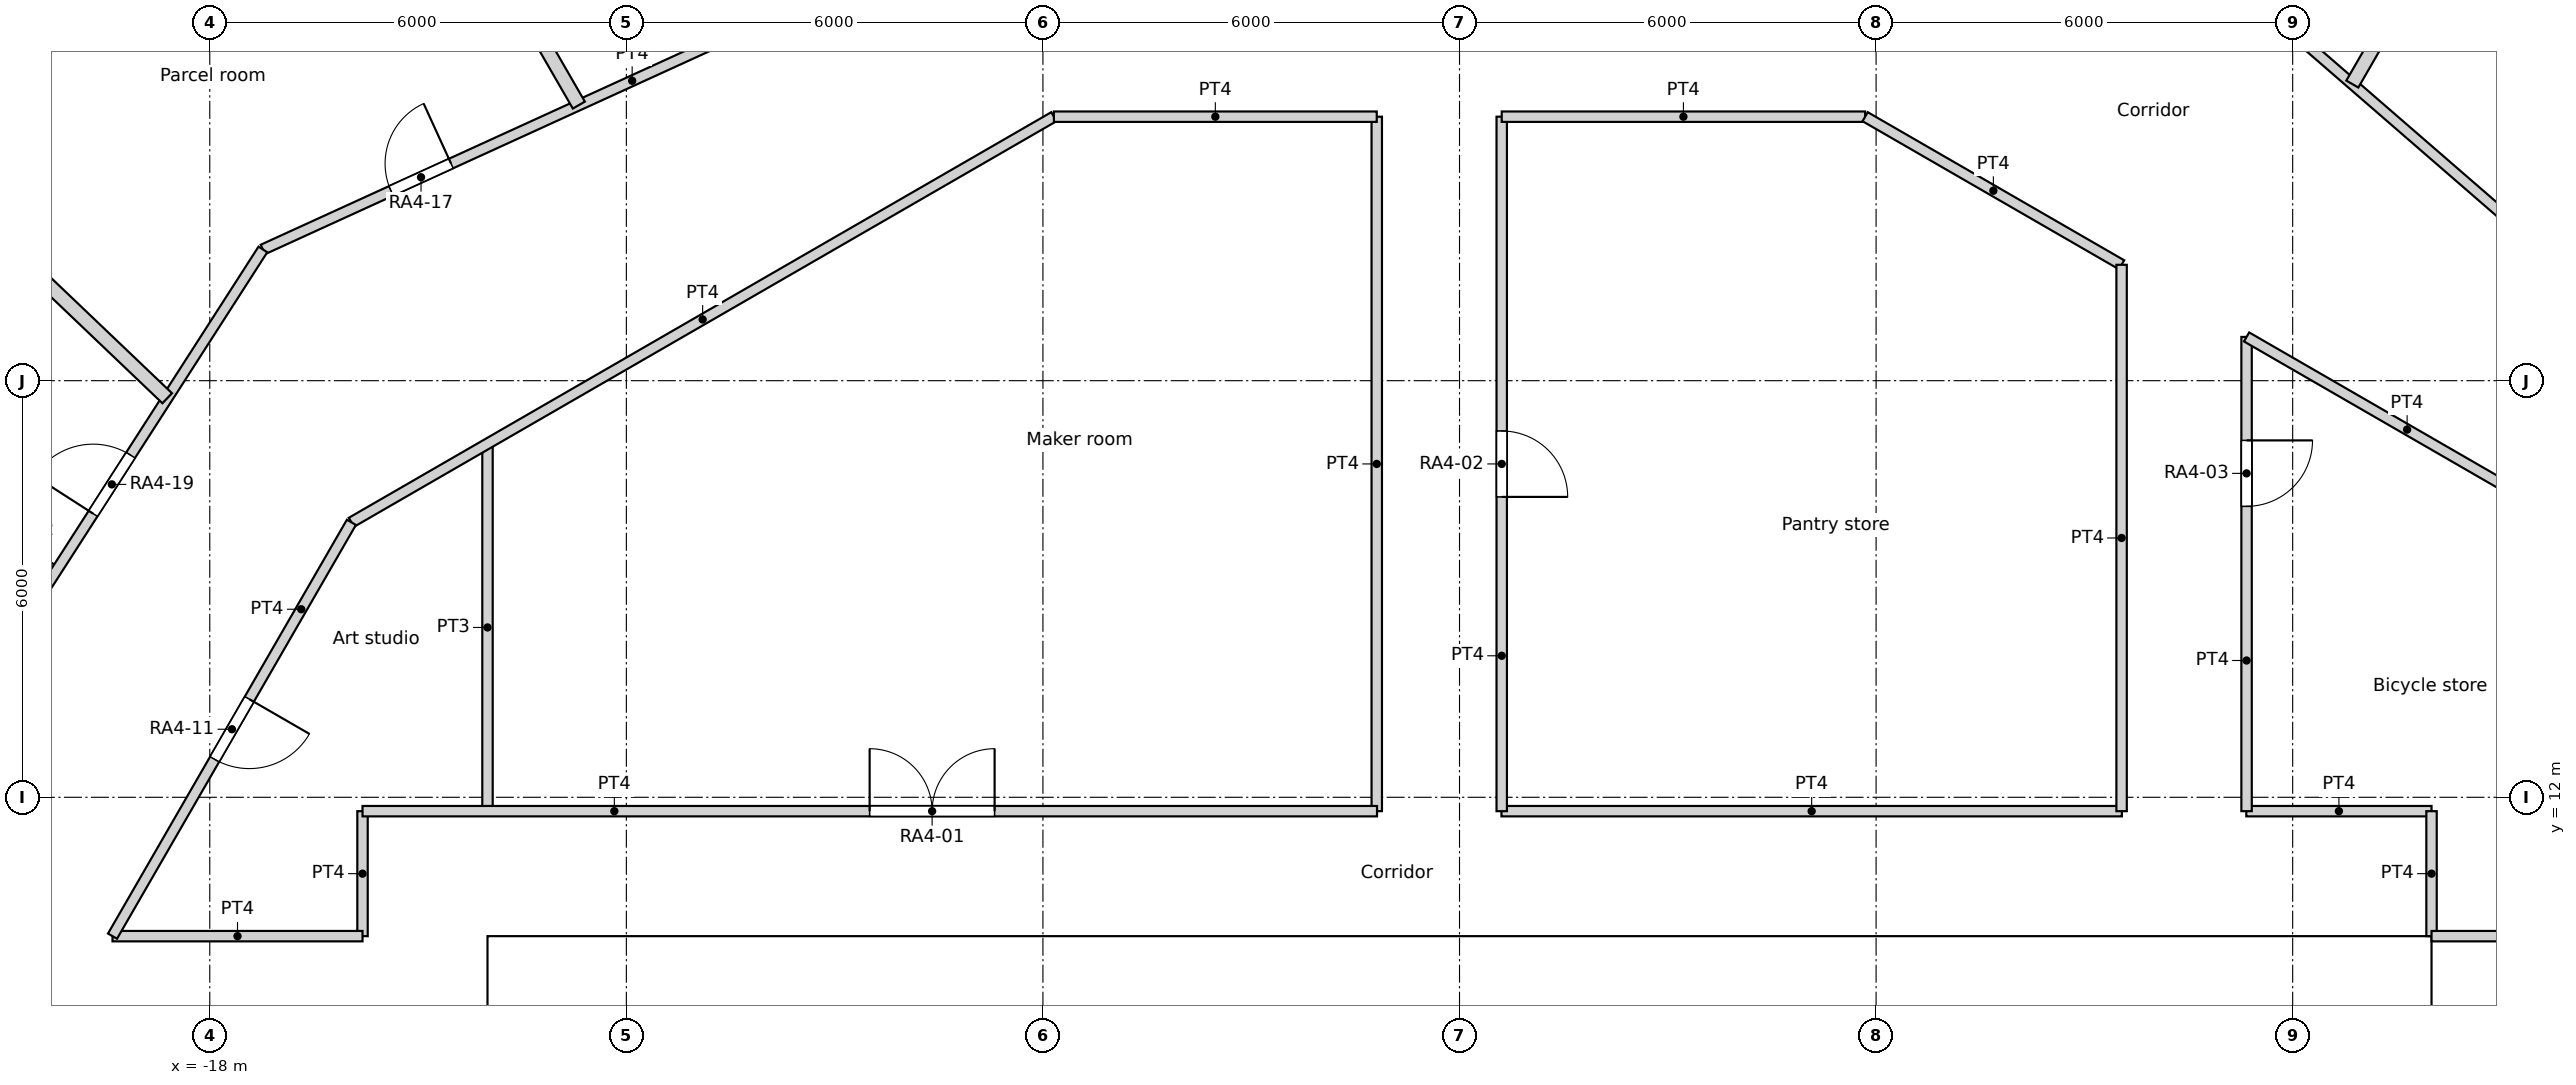
"""IFC4 building model, lengths in metres.
Left out: names, types, materials, properties, quantities, classifications, styles, units other than length and angle.
Written with IfcOpenShell. Run it as: python <this file> out.ifc"""

import sys

from ifc_helpers import new_model, si_unit, direction, frame, frame_2d, origin, origin_2d, place, context, subcontext, project, spatial, rectangle, circle, extrude, element, fill, save


model = new_model("IFC4")
c1 = context("Model", 3, precision=1e-05, world=origin(), true_north=direction((0.0, 1.0)))
c2 = subcontext(c1, "Body", "Model", "MODEL_VIEW")
j1 = project(units=[si_unit("LENGTHUNIT", "METRE"), si_unit("PLANEANGLEUNIT", "RADIAN")], contexts=[c1])
p1 = place(None, origin())
s1 = spatial("IfcSite", under=j1, at=p1, CompositionType="ELEMENT")
p2 = place(p1, origin())
s2 = spatial("IfcBuilding", under=s1, at=p2, CompositionType="ELEMENT")
p3 = place(p2, frame((0.0, 0.0, 60.6)))
s3 = spatial("IfcBuildingStorey", under=s2, at=p3, CompositionType="ELEMENT", Elevation=60.6)
p4 = place(p3, frame((-19.826, 22.88, 0.0), z_axis=(0.0, 0.0, 1.0), x_axis=(1.0, 0.0, 0.0)))
e1 = element("IfcColumn", 1, at=p4, inside=s3, PredefinedType="COLUMN", context=c2, shape_type="SweptSolid", body=[
    extrude(circle(Radius=0.7, at=origin_2d()), origin(), (0.0, 0.0, 1.0), 3.6),
])
for number, where, z_axis, x_axis in (
    (2, (14.659, 19.69, 0.0), (0.0, 0.0, 1.0), (1.0, 0.0, 0.0)),
    (3, (9.723, 22.54, 0.0), (0.0, 0.0, 1.0), (1.0, 0.0, 0.0)),
    (4, (-12.274, 21.259, 0.0), (0.0, 0.0, 1.0), (1.0, 0.0, 0.0)),
    (5, (-16.846, 17.855, 0.0), (0.0, 0.0, 1.0), (1.0, 0.0, 0.0)),
    (6, (-20.509, 13.489, 0.0), (0.0, 0.0, 1.0), (1.0, 0.0, 0.0)),
):
    element("IfcColumn", number, at=place(p3, frame(where, z_axis=z_axis, x_axis=x_axis)), inside=s3, PredefinedType="COLUMN", context=c2, shape_type="SweptSolid", body=[
        extrude(circle(Radius=0.75, at=origin_2d()), origin(), (0.0, 0.0, 1.0), 3.6),
    ])
for number, where, z_axis, x_axis in (
    (7, (15.552, 10.603, 0.0), (0.0, 0.0, 1.0), (1.0, 0.0, 0.0)),
    (8, (11.735, 14.716, 0.0), (0.0, 0.0, 1.0), (1.0, 0.0, 0.0)),
    (9, (6.876, 17.521, 0.0), (0.0, 0.0, 1.0), (1.0, 0.0, 0.0)),
    (10, (1.406, 18.77, 0.0), (0.0, 0.0, 1.0), (1.0, 0.0, 0.0)),
    (11, (-4.188, 18.35, 0.0), (0.0, 0.0, 1.0), (1.0, 0.0, 0.0)),
    (12, (-9.411, 16.301, 0.0), (0.0, 0.0, 1.0), (1.0, 0.0, 0.0)),
    (13, (-13.798, 12.802, 0.0), (0.0, 0.0, 1.0), (1.0, 0.0, 0.0)),
):
    element("IfcColumn", number, at=place(p3, frame(where, z_axis=z_axis, x_axis=x_axis)), inside=s3, PredefinedType="COLUMN", context=c2, shape_type="SweptSolid", body=[
        extrude(circle(Radius=0.8, at=origin_2d()), origin(), (0.0, 0.0, 1.0), 3.6),
    ])
p5 = place(p3, frame((-14.0, 9.4, 0.0), z_axis=(0.0, 0.0, 1.0), x_axis=(1.0, 0.0, 0.0)))
e14 = element("IfcWall", 14, at=p5, inside=s3, PredefinedType="SOLIDWALL", context=c2, shape_type="SweptSolid", body=[
    extrude(rectangle(XDim=28.0, YDim=1.2, at=frame_2d((14.0, 0.0))), origin(), (0.0, 0.0, 1.0), 3.6),
])
p6 = place(p5, frame((9.8, 0.0, 0.0)))
e15 = element("IfcOpeningElement", 15, at=p6, cuts=e14, PredefinedType="OPENING", context=c2, shape_type="SweptSolid", body=[
    extrude(rectangle(XDim=1.8, YDim=2.1, at=frame_2d((0.9, 1.05))), frame((0.0, 0.6, 0.0), z_axis=(0.0, -1.0, 0.0), x_axis=(1.0, 0.0, 0.0)), (0.0, 0.0, 1.0), 1.2),
])
p7 = place(p3, frame((-15.8, 11.8, 0.0), z_axis=(0.0, 0.0, 1.0), x_axis=(1.0, 0.0, 0.0)))
e16 = element("IfcWall", 16, at=p7, inside=s3, PredefinedType="PARTITIONING", context=c2, shape_type="SweptSolid", body=[
    extrude(rectangle(XDim=14.612, YDim=0.15, at=frame_2d((7.306, 0.0))), origin(), (0.0, 0.0, 1.0), 3.15),
])
p8 = place(p7, frame((7.304, 0.0, 0.0)))
e17 = element("IfcOpeningElement", 17, at=p8, cuts=e16, PredefinedType="OPENING", context=c2, shape_type="SweptSolid", body=[
    extrude(rectangle(XDim=1.8, YDim=2.1, at=frame_2d((0.9, 1.05))), frame((0.0, 0.075, 0.0), z_axis=(0.0, -1.0, 0.0), x_axis=(1.0, 0.0, 0.0)), (0.0, 0.0, 1.0), 0.15),
])
p9 = place(p3, frame((0.604, 11.8, 0.0), z_axis=(0.0, 0.0, 1.0), x_axis=(1.0, 0.0, 0.0)))
e18 = element("IfcWall", 18, at=p9, inside=s3, PredefinedType="PARTITIONING", context=c2, shape_type="SweptSolid", body=[
    extrude(rectangle(XDim=8.936, YDim=0.15, at=frame_2d((4.468, 0.0))), origin(), (0.0, 0.0, 1.0), 3.15),
])
p10 = place(p3, frame((11.332, 11.8, 0.0), z_axis=(0.0, 0.0, 1.0), x_axis=(1.0, 0.0, 0.0)))
e19 = element("IfcWall", 19, at=p10, inside=s3, PredefinedType="PARTITIONING", context=c2, shape_type="SweptSolid", body=[
    extrude(rectangle(XDim=2.668, YDim=0.15, at=frame_2d((1.334, 0.0))), origin(), (0.0, 0.0, 1.0), 3.15),
])
for number, where, z_axis, x_axis in (
    (20, (14.0, 10.0, 0.0), (0.0, 0.0, 1.0), (0.0, 1.0, 0.0)),
    (21, (-15.8, 10.0, 0.0), (0.0, 0.0, 1.0), (0.0, 1.0, 0.0)),
):
    element("IfcWall", number, at=place(p3, frame(where, z_axis=z_axis, x_axis=x_axis)), inside=s3, PredefinedType="PARTITIONING", context=c2, shape_type="SweptSolid", body=[
        extrude(rectangle(XDim=1.8, YDim=0.15, at=frame_2d((0.9, 0.0))), origin(), (0.0, 0.0, 1.0), 3.15),
    ])
p11 = place(p3, frame((14.0, 10.0, 0.0), z_axis=(0.0, 0.0, 1.0), x_axis=(1.0, 0.0, 0.0)))
e22 = element("IfcWall", 22, at=p11, inside=s3, PredefinedType="PARTITIONING", context=c2, shape_type="SweptSolid", body=[
    extrude(rectangle(XDim=5.401, YDim=0.15, at=frame_2d((2.7, 0.0))), origin(), (0.0, 0.0, 1.0), 3.15),
])
p12 = place(p3, frame((10.933, 23.94, 0.0), z_axis=(0.0, 0.0, 1.0), x_axis=(0.755770011705, -0.654837147242, 0.0)))
e23 = element("IfcWall", 23, at=p12, inside=s3, PredefinedType="PARTITIONING", context=c2, shape_type="SweptSolid", body=[
    extrude(rectangle(XDim=14.83, YDim=0.15, at=frame_2d((7.415, 0.0))), origin(), (0.0, 0.0, 1.0), 3.15),
])
p13 = place(p12, frame((6.807, 0.0, 0.0)))
e24 = element("IfcOpeningElement", 24, at=p13, cuts=e23, PredefinedType="OPENING", context=c2, shape_type="SweptSolid", body=[
    extrude(rectangle(XDim=0.95, YDim=2.1, at=frame_2d((0.475, 1.05))), frame((0.0, 0.075, 0.0), z_axis=(0.0, -1.0, 0.0), x_axis=(1.0, 0.0, 0.0)), (0.0, 0.0, 1.0), 0.15),
])
p14 = place(p3, frame((-1.192, 11.8, 0.0), z_axis=(0.0, 0.0, 1.0), x_axis=(0.0, 1.0, 0.0)))
e25 = element("IfcWall", 25, at=p14, inside=s3, PredefinedType="PARTITIONING", context=c2, shape_type="SweptSolid", body=[
    extrude(rectangle(XDim=10.002, YDim=0.15, at=frame_2d((5.001, 0.0))), origin(), (0.0, 0.0, 1.0), 3.15),
])
p15 = place(p3, frame((-5.842, 21.802, 0.0), z_axis=(0.0, 0.0, 1.0), x_axis=(1.0, 0.0, 0.0)))
e26 = element("IfcWall", 26, at=p15, inside=s3, PredefinedType="PARTITIONING", context=c2, shape_type="SweptSolid", body=[
    extrude(rectangle(XDim=4.65, YDim=0.15, at=frame_2d((2.325, 0.0))), origin(), (0.0, 0.0, 1.0), 3.15),
])
p16 = place(p3, frame((-15.96, 15.96, 0.0), z_axis=(0.0, 0.0, 1.0), x_axis=(0.866022730501, 0.500004630234, 0.0)))
e27 = element("IfcWall", 27, at=p16, inside=s3, PredefinedType="PARTITIONING", context=c2, shape_type="SweptSolid", body=[
    extrude(rectangle(XDim=11.684, YDim=0.15, at=frame_2d((5.842, 0.0))), origin(), (0.0, 0.0, 1.0), 3.15),
])
p17 = place(p3, frame((9.536, 11.8, 0.0), z_axis=(0.0, 0.0, 1.0), x_axis=(0.0, 1.0, 0.0)))
e28 = element("IfcWall", 28, at=p17, inside=s3, PredefinedType="PARTITIONING", context=c2, shape_type="SweptSolid", body=[
    extrude(rectangle(XDim=7.869, YDim=0.15, at=frame_2d((3.935, 0.0))), origin(), (0.0, 0.0, 1.0), 3.15),
])
p18 = place(p3, frame((5.842, 21.802, 0.0), z_axis=(0.0, 0.0, 1.0), x_axis=(0.865983505205, -0.500072563448, 0.0)))
e29 = element("IfcWall", 29, at=p18, inside=s3, PredefinedType="PARTITIONING", context=c2, shape_type="SweptSolid", body=[
    extrude(rectangle(XDim=4.265, YDim=0.15, at=frame_2d((2.133, 0.0))), origin(), (0.0, 0.0, 1.0), 3.15),
])
p19 = place(p3, frame((0.608, 21.802, 0.0), z_axis=(0.0, 0.0, 1.0), x_axis=(1.0, 0.0, 0.0)))
e30 = element("IfcWall", 30, at=p19, inside=s3, PredefinedType="PARTITIONING", context=c2, shape_type="SweptSolid", body=[
    extrude(rectangle(XDim=5.234, YDim=0.15, at=frame_2d((2.617, 0.0))), origin(), (0.0, 0.0, 1.0), 3.15),
])
p20 = place(p3, frame((0.608, 11.8, 0.0), z_axis=(0.0, 0.0, 1.0), x_axis=(0.0, 1.0, 0.0)))
e31 = element("IfcWall", 31, at=p20, inside=s3, PredefinedType="PARTITIONING", context=c2, shape_type="SweptSolid", body=[
    extrude(rectangle(XDim=10.002, YDim=0.15, at=frame_2d((5.001, 0.0))), origin(), (0.0, 0.0, 1.0), 3.15),
])
p21 = place(p20, frame((4.526, 0.0, 0.0)))
e32 = element("IfcOpeningElement", 32, at=p21, cuts=e31, PredefinedType="OPENING", context=c2, shape_type="SweptSolid", body=[
    extrude(rectangle(XDim=0.95, YDim=2.1, at=frame_2d((0.475, 1.05))), frame((0.0, 0.075, 0.0), z_axis=(0.0, -1.0, 0.0), x_axis=(1.0, 0.0, 0.0)), (0.0, 0.0, 1.0), 0.15),
])
p22 = place(p3, frame((11.336, 18.63, 0.0), z_axis=(0.0, 0.0, 1.0), x_axis=(0.866056911224, -0.499945423543, 0.0)))
e33 = element("IfcWall", 33, at=p22, inside=s3, PredefinedType="PARTITIONING", context=c2, shape_type="SweptSolid", body=[
    extrude(rectangle(XDim=5.339, YDim=0.15, at=frame_2d((2.67, 0.0))), origin(), (0.0, 0.0, 1.0), 3.15),
])
p23 = place(p3, frame((11.336, 11.8, 0.0), z_axis=(0.0, 0.0, 1.0), x_axis=(0.0, 1.0, 0.0)))
e34 = element("IfcWall", 34, at=p23, inside=s3, PredefinedType="PARTITIONING", context=c2, shape_type="SweptSolid", body=[
    extrude(rectangle(XDim=6.83, YDim=0.15, at=frame_2d((3.415, 0.0))), origin(), (0.0, 0.0, 1.0), 3.15),
])
p24 = place(p23, frame((4.39, 0.0, 0.0)))
e35 = element("IfcOpeningElement", 35, at=p24, cuts=e34, PredefinedType="OPENING", context=c2, shape_type="SweptSolid", body=[
    extrude(rectangle(XDim=0.95, YDim=2.1, at=frame_2d((0.475, 1.05))), frame((0.0, 0.075, 0.0), z_axis=(0.0, -1.0, 0.0), x_axis=(1.0, 0.0, 0.0)), (0.0, 0.0, 1.0), 0.15),
])
p25 = place(p3, frame((-17.235, 19.89, 0.0), z_axis=(0.0, 0.0, 1.0), x_axis=(0.909599826886, 0.415485444907, 0.0)))
e36 = element("IfcWall", 36, at=p25, inside=s3, PredefinedType="PARTITIONING", context=c2, shape_type="SweptSolid", body=[
    extrude(rectangle(XDim=14.829, YDim=0.15, at=frame_2d((7.415, 0.0))), origin(), (0.0, 0.0, 1.0), 3.15),
])
p26 = place(p25, frame((8.715, 0.0, 0.0)))
e37 = element("IfcOpeningElement", 37, at=p26, cuts=e36, PredefinedType="OPENING", context=c2, shape_type="SweptSolid", body=[
    extrude(rectangle(XDim=1.0, YDim=2.04, at=frame_2d((0.5, 1.02))), frame((0.0, 0.075, 0.0), z_axis=(0.0, -1.0, 0.0), x_axis=(1.0, 0.0, 0.0)), (0.0, 0.0, 1.0), 0.15),
])
p27 = place(p25, frame((2.029, 0.0, 0.0)))
e38 = element("IfcOpeningElement", 38, at=p27, cuts=e36, PredefinedType="OPENING", context=c2, shape_type="SweptSolid", body=[
    extrude(rectangle(XDim=0.95, YDim=2.1, at=frame_2d((0.475, 1.05))), frame((0.0, 0.075, 0.0), z_axis=(0.0, -1.0, 0.0), x_axis=(1.0, 0.0, 0.0)), (0.0, 0.0, 1.0), 0.15),
])
p28 = place(p3, frame((-25.255, 7.416, 0.0), z_axis=(0.0, 0.0, 1.0), x_axis=(0.540805851332, 0.841147449123, 0.0)))
e39 = element("IfcWall", 39, at=p28, inside=s3, PredefinedType="PARTITIONING", context=c2, shape_type="SweptSolid", body=[
    extrude(rectangle(XDim=14.829, YDim=0.15, at=frame_2d((7.415, 0.0))), origin(), (0.0, 0.0, 1.0), 3.15),
])
p29 = place(p28, frame((10.307, 0.0, 0.0)))
e40 = element("IfcOpeningElement", 40, at=p29, cuts=e39, PredefinedType="OPENING", context=c2, shape_type="SweptSolid", body=[
    extrude(rectangle(XDim=1.0, YDim=2.1, at=frame_2d((0.5, 1.05))), frame((0.0, 0.075, 0.0), z_axis=(0.0, -1.0, 0.0), x_axis=(1.0, 0.0, 0.0)), (0.0, 0.0, 1.0), 0.15),
])
p30 = place(p28, frame((3.522, 0.0, 0.0)))
e41 = element("IfcOpeningElement", 41, at=p30, cuts=e39, PredefinedType="OPENING", context=c2, shape_type="SweptSolid", body=[
    extrude(rectangle(XDim=1.0, YDim=2.1, at=frame_2d((0.5, 1.05))), frame((0.0, 0.075, 0.0), z_axis=(0.0, -1.0, 0.0), x_axis=(1.0, 0.0, 0.0)), (0.0, 0.0, 1.0), 0.15),
])
p31 = place(p3, frame((-19.401, 10.0, 0.0), z_axis=(0.0, 0.0, 1.0), x_axis=(0.499992689227, 0.86602962462, 0.0)))
e42 = element("IfcWall", 42, at=p31, inside=s3, PredefinedType="PARTITIONING", context=c2, shape_type="SweptSolid", body=[
    extrude(rectangle(XDim=6.882, YDim=0.15, at=frame_2d((3.441, 0.0))), origin(), (0.0, 0.0, 1.0), 3.15),
])
p32 = place(p31, frame((2.941, 0.0, 0.0)))
e43 = element("IfcOpeningElement", 43, at=p32, cuts=e42, PredefinedType="OPENING", context=c2, shape_type="SweptSolid", body=[
    extrude(rectangle(XDim=1.0, YDim=2.04, at=frame_2d((0.5, 1.02))), frame((0.0, 0.075, 0.0), z_axis=(0.0, -1.0, 0.0), x_axis=(1.0, 0.0, 0.0)), (0.0, 0.0, 1.0), 0.15),
])
p33 = place(p3, frame((-19.401, 10.0, 0.0), z_axis=(0.0, 0.0, 1.0), x_axis=(1.0, 0.0, 0.0)))
e44 = element("IfcWall", 44, at=p33, inside=s3, PredefinedType="PARTITIONING", context=c2, shape_type="SweptSolid", body=[
    extrude(rectangle(XDim=3.601, YDim=0.15, at=frame_2d((1.8, 0.0))), origin(), (0.0, 0.0, 1.0), 3.15),
])
p34 = place(p3, frame((-14.0, 11.8, 0.0), z_axis=(0.0, 0.0, 1.0), x_axis=(0.0, 1.0, 0.0)))
e45 = element("IfcWall", 45, at=p34, inside=s3, PredefinedType="PARTITIONING", context=c2, shape_type="SweptSolid", body=[
    extrude(rectangle(XDim=5.292, YDim=0.15, at=frame_2d((2.646, 0.0))), origin(), (0.0, 0.0, 1.0), 3.15),
])
p35 = place(p3, frame((12.859, 22.272, 0.0), z_axis=(0.0, 0.0, 1.0), x_axis=(0.499968073049, 0.866043836033, 0.0)))
e46 = element("IfcWall", 46, at=p35, inside=s3, PredefinedType="PARTITIONING", context=c2, shape_type="SweptSolid", body=[
    extrude(rectangle(XDim=5.507, YDim=0.2, at=frame_2d((2.753, 0.0))), origin(), (0.0, 0.0, 1.0), 3.15),
])
p36 = place(p3, frame((-15.612, 27.041, 0.0), z_axis=(0.0, 0.0, 1.0), x_axis=(0.499954606878, -0.86605160993, 0.0)))
e47 = element("IfcWall", 47, at=p36, inside=s3, PredefinedType="PARTITIONING", context=c2, shape_type="SweptSolid", body=[
    extrude(rectangle(XDim=5.856, YDim=0.2, at=frame_2d((2.928, 0.0))), origin(), (0.0, 0.0, 1.0), 3.15),
])
p37 = place(p3, frame((-22.598, 21.547, 0.0), z_axis=(0.0, 0.0, 1.0), x_axis=(0.723689650329, -0.690125561044, 0.0)))
e48 = element("IfcWall", 48, at=p37, inside=s3, PredefinedType="PARTITIONING", context=c2, shape_type="SweptSolid", body=[
    extrude(rectangle(XDim=5.506, YDim=0.2, at=frame_2d((2.753, 0.0))), origin(), (0.0, 0.0, 1.0), 3.15),
])
p38 = place(p3, frame((-22.119, 16.628, 0.0), z_axis=(0.0, 0.0, 1.0), x_axis=(0.814498780807, -0.580165266165, 0.0)))
e49 = element("IfcWall", 49, at=p38, inside=s3, PredefinedType="PARTITIONING", context=c2, shape_type="SweptSolid", body=[
    extrude(rectangle(XDim=2.347, YDim=0.1, at=frame_2d((1.174, 0.0))), origin(), (0.0, 0.0, 1.0), 3.15),
])
p39 = place(p38, frame((0.723, 0.0, 0.0)))
e50 = element("IfcOpeningElement", 50, at=p39, cuts=e49, PredefinedType="OPENING", context=c2, shape_type="SweptSolid", body=[
    extrude(rectangle(XDim=0.9, YDim=2.04, at=frame_2d((0.45, 1.02))), frame((0.0, 0.05, 0.0), z_axis=(0.0, -1.0, 0.0), x_axis=(1.0, 0.0, 0.0)), (0.0, 0.0, 1.0), 0.1),
])
p40 = place(p6, origin())
e51 = element("IfcDoor", 51, at=p40, inside=s3, OperationType="DOUBLE_DOOR_SINGLE_SWING", PredefinedType="DOOR", context=c2, shape_type="SweptSolid", body=[
    extrude(rectangle(XDim=1.8, YDim=2.1, at=frame_2d((0.9, 1.05))), frame((0.0, 0.025, 0.0), z_axis=(0.0, -1.0, 0.0), x_axis=(1.0, 0.0, 0.0)), (0.0, 0.0, 1.0), 0.05),
])
fill(e15, e51)
p41 = place(p8, origin())
e52 = element("IfcDoor", 52, at=p41, inside=s3, OperationType="DOUBLE_DOOR_SINGLE_SWING", PredefinedType="DOOR", context=c2, shape_type="SweptSolid", body=[
    extrude(rectangle(XDim=1.8, YDim=2.1, at=frame_2d((0.9, 1.05))), frame((0.0, 0.025, 0.0), z_axis=(0.0, -1.0, 0.0), x_axis=(1.0, 0.0, 0.0)), (0.0, 0.0, 1.0), 0.05),
])
fill(e17, e52)
p42 = place(p21, origin())
e53 = element("IfcDoor", 53, at=p42, inside=s3, OperationType="SINGLE_SWING_RIGHT", PredefinedType="DOOR", context=c2, shape_type="SweptSolid", body=[
    extrude(rectangle(XDim=0.95, YDim=2.1, at=frame_2d((0.475, 1.05))), frame((0.0, 0.025, 0.0), z_axis=(0.0, -1.0, 0.0), x_axis=(1.0, 0.0, 0.0)), (0.0, 0.0, 1.0), 0.05),
])
fill(e32, e53)
p43 = place(p24, origin())
e54 = element("IfcDoor", 54, at=p43, inside=s3, OperationType="SINGLE_SWING_LEFT", PredefinedType="DOOR", context=c2, shape_type="SweptSolid", body=[
    extrude(rectangle(XDim=0.95, YDim=2.1, at=frame_2d((0.475, 1.05))), frame((0.0, 0.025, 0.0), z_axis=(0.0, -1.0, 0.0), x_axis=(1.0, 0.0, 0.0)), (0.0, 0.0, 1.0), 0.05),
])
fill(e35, e54)
p44 = place(p32, origin())
e55 = element("IfcDoor", 55, at=p44, inside=s3, OperationType="SINGLE_SWING_LEFT", PredefinedType="DOOR", context=c2, shape_type="SweptSolid", body=[
    extrude(rectangle(XDim=1.0, YDim=2.04, at=frame_2d((0.5, 1.02))), frame((0.0, 0.025, 0.0), z_axis=(0.0, -1.0, 0.0), x_axis=(1.0, 0.0, 0.0)), (0.0, 0.0, 1.0), 0.05),
])
fill(e43, e55)
p45 = place(p27, origin())
e56 = element("IfcDoor", 56, at=p45, inside=s3, OperationType="SINGLE_SWING_RIGHT", PredefinedType="DOOR", context=c2, shape_type="SweptSolid", body=[
    extrude(rectangle(XDim=0.95, YDim=2.1, at=frame_2d((0.475, 1.05))), frame((0.0, 0.025, 0.0), z_axis=(0.0, -1.0, 0.0), x_axis=(1.0, 0.0, 0.0)), (0.0, 0.0, 1.0), 0.05),
])
fill(e38, e56)
p46 = place(p29, origin())
e57 = element("IfcDoor", 57, at=p46, inside=s3, OperationType="SINGLE_SWING_LEFT", PredefinedType="DOOR", context=c2, shape_type="SweptSolid", body=[
    extrude(rectangle(XDim=1.0, YDim=2.1, at=frame_2d((0.5, 1.05))), frame((0.0, 0.025, 0.0), z_axis=(0.0, -1.0, 0.0), x_axis=(1.0, 0.0, 0.0)), (0.0, 0.0, 1.0), 0.05),
])
fill(e40, e57)
save(model, sys.argv[1])
